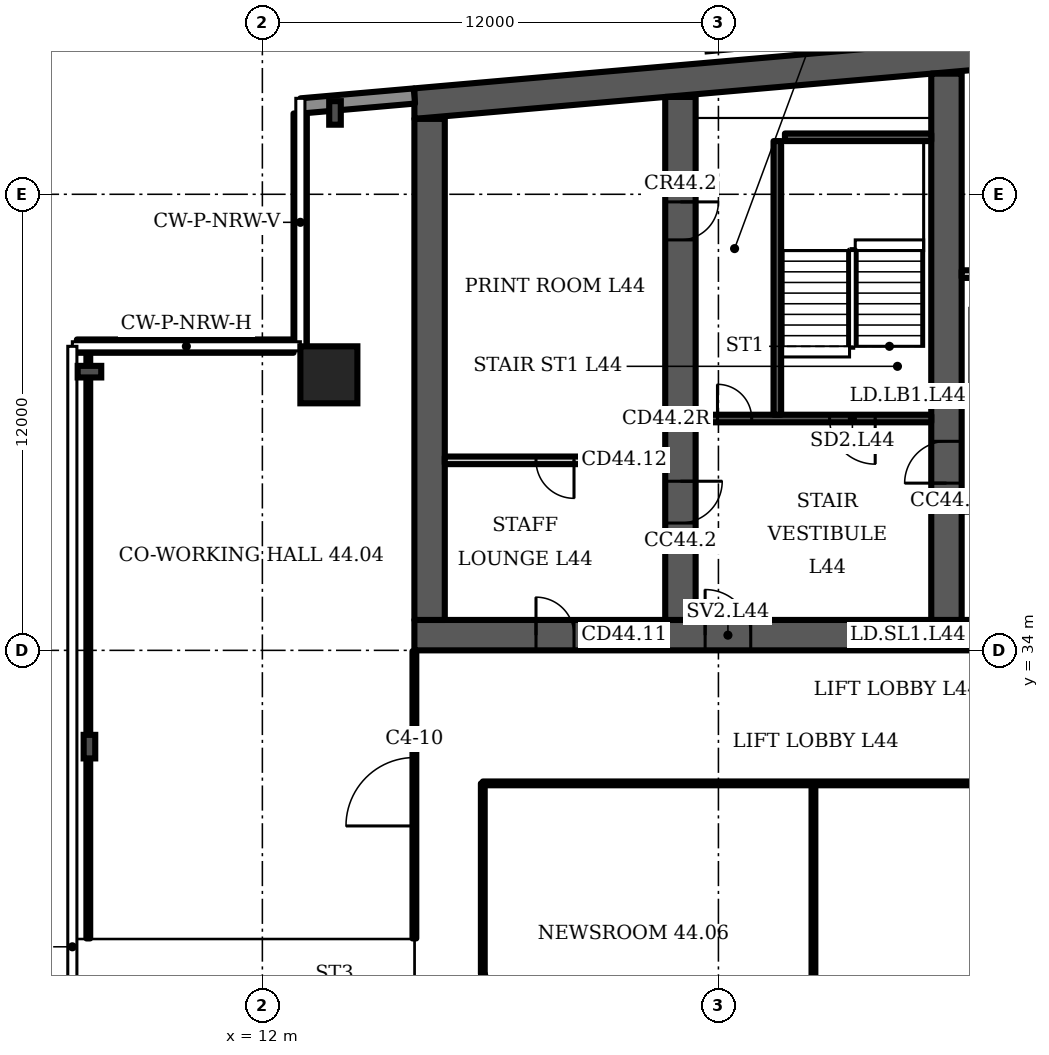
"""IFC4 building model, lengths in metres.
Left out: names, types, materials, properties, quantities, classifications, styles, units other than length and angle.
Written with IfcOpenShell. Run it as: python <this file> out.ifc"""

import sys

from ifc_helpers import new_model, si_unit, direction, frame, frame_2d, origin, origin_2d, place, context, subcontext, project, spatial, polyline, rectangle, i_section, outline, extrude, element, fill, save


model = new_model("IFC4")
c1 = context("Model", 3, precision=1e-05, world=origin(), true_north=direction((0.0, 1.0)))
c2 = subcontext(c1, "Body", "Model", "MODEL_VIEW")
j1 = project(units=[si_unit("LENGTHUNIT", "METRE"), si_unit("PLANEANGLEUNIT", "RADIAN")], contexts=[c1])
p1 = place(None, origin())
s1 = spatial("IfcSite", under=j1, at=p1, CompositionType="ELEMENT")
p2 = place(p1, origin())
s2 = spatial("IfcBuilding", under=s1, at=p2, CompositionType="ELEMENT")
p3 = place(p2, frame((0.0, 0.0, 180.7)))
s3 = spatial("IfcBuildingStorey", under=s2, at=p3, CompositionType="ELEMENT", Elevation=180.7)
p4 = place(p3, origin())
e1 = element("IfcWall", 1, at=p4, inside=s3, PredefinedType="SHEAR", context=c2, shape_type="SweptSolid", body=[
    extrude(outline(polyline([(16.0, 47.984), (37.0, 49.822), (58.0, 47.984), (58.0, 48.787), (37.0, 50.625), (16.0, 48.787), (16.0, 47.984)])), origin(), (0.0, 0.0, 1.0), 3.6),
])
p5 = place(p3, frame((16.0, 34.4, 0.0), z_axis=(0.0, 0.0, 1.0), x_axis=(1.0, 0.0, 0.0)))
e2 = element("IfcWall", 2, at=p5, inside=s3, PredefinedType="SHEAR", context=c2, shape_type="SweptSolid", body=[
    extrude(rectangle(XDim=42.0, YDim=0.8, at=frame_2d((21.0, 0.0))), origin(), (0.0, 0.0, 1.0), 3.6),
])
p6 = place(p5, frame((3.2, 0.0, 0.0)))
e3 = element("IfcOpeningElement", 3, at=p6, cuts=e2, PredefinedType="OPENING", context=c2, shape_type="SweptSolid", body=[
    extrude(rectangle(XDim=1.0, YDim=2.1, at=frame_2d((0.5, 1.05))), frame((0.0, 0.41, 0.0), z_axis=(0.0, -1.0, 0.0), x_axis=(1.0, 0.0, 0.0)), (0.0, 0.0, 1.0), 0.82),
])
p7 = place(p5, frame((7.65, 0.0, 0.0)))
e4 = element("IfcOpeningElement", 4, at=p7, cuts=e2, PredefinedType="OPENING", context=c2, shape_type="SweptSolid", body=[
    extrude(rectangle(XDim=1.2, YDim=2.1, at=frame_2d((0.6, 1.05))), frame((0.0, 0.41, 0.0), z_axis=(0.0, -1.0, 0.0), x_axis=(1.0, 0.0, 0.0)), (0.0, 0.0, 1.0), 0.82),
])
p8 = place(p5, frame((14.767, 0.0, 0.0)))
e5 = element("IfcOpeningElement", 5, at=p8, cuts=e2, PredefinedType="OPENING", context=c2, shape_type="SweptSolid", body=[
    extrude(rectangle(XDim=1.1, YDim=2.1, at=frame_2d((0.55, 1.05))), frame((0.0, 0.41, 0.0), z_axis=(0.0, -1.0, 0.0), x_axis=(1.0, 0.0, 0.0)), (0.0, 0.0, 1.0), 0.82),
])
p9 = place(p5, frame((19.133, 0.0, 0.0)))
e6 = element("IfcOpeningElement", 6, at=p9, cuts=e2, PredefinedType="OPENING", context=c2, shape_type="SweptSolid", body=[
    extrude(rectangle(XDim=1.1, YDim=2.1, at=frame_2d((0.55, 1.05))), frame((0.0, 0.41, 0.0), z_axis=(0.0, -1.0, 0.0), x_axis=(1.0, 0.0, 0.0)), (0.0, 0.0, 1.0), 0.82),
])
p10 = place(p5, frame((16.8, 0.0, 0.0)))
e7 = element("IfcOpeningElement", 7, at=p10, cuts=e2, PredefinedType="OPENING", context=c2, shape_type="SweptSolid", body=[
    extrude(rectangle(XDim=1.4, YDim=2.1, at=frame_2d((0.7, 1.05))), frame((0.0, 0.41, 0.0), z_axis=(0.0, -1.0, 0.0), x_axis=(1.0, 0.0, 0.0)), (0.0, 0.0, 1.0), 0.82),
])
p11 = place(p5, frame((21.767, 0.0, 0.0)))
e8 = element("IfcOpeningElement", 8, at=p11, cuts=e2, PredefinedType="OPENING", context=c2, shape_type="SweptSolid", body=[
    extrude(rectangle(XDim=1.1, YDim=2.1, at=frame_2d((0.55, 1.05))), frame((0.0, 0.41, 0.0), z_axis=(0.0, -1.0, 0.0), x_axis=(1.0, 0.0, 0.0)), (0.0, 0.0, 1.0), 0.82),
])
p12 = place(p5, frame((23.95, 0.0, 0.0)))
e9 = element("IfcOpeningElement", 9, at=p12, cuts=e2, PredefinedType="OPENING", context=c2, shape_type="SweptSolid", body=[
    extrude(rectangle(XDim=1.1, YDim=2.1, at=frame_2d((0.55, 1.05))), frame((0.0, 0.41, 0.0), z_axis=(0.0, -1.0, 0.0), x_axis=(1.0, 0.0, 0.0)), (0.0, 0.0, 1.0), 0.82),
])
p13 = place(p5, frame((26.133, 0.0, 0.0)))
e10 = element("IfcOpeningElement", 10, at=p13, cuts=e2, PredefinedType="OPENING", context=c2, shape_type="SweptSolid", body=[
    extrude(rectangle(XDim=1.1, YDim=2.1, at=frame_2d((0.55, 1.05))), frame((0.0, 0.41, 0.0), z_axis=(0.0, -1.0, 0.0), x_axis=(1.0, 0.0, 0.0)), (0.0, 0.0, 1.0), 0.82),
])
p14 = place(p5, frame((33.15, 0.0, 0.0)))
e11 = element("IfcOpeningElement", 11, at=p14, cuts=e2, PredefinedType="OPENING", context=c2, shape_type="SweptSolid", body=[
    extrude(rectangle(XDim=1.2, YDim=2.1, at=frame_2d((0.6, 1.05))), frame((0.0, 0.41, 0.0), z_axis=(0.0, -1.0, 0.0), x_axis=(1.0, 0.0, 0.0)), (0.0, 0.0, 1.0), 0.82),
])
p15 = place(p5, frame((37.767, 0.0, 0.0)))
e12 = element("IfcOpeningElement", 12, at=p15, cuts=e2, PredefinedType="OPENING", context=c2, shape_type="SweptSolid", body=[
    extrude(rectangle(XDim=1.4, YDim=2.1, at=frame_2d((0.7, 1.05))), frame((0.0, 0.41, 0.0), z_axis=(0.0, -1.0, 0.0), x_axis=(1.0, 0.0, 0.0)), (0.0, 0.0, 1.0), 0.82),
])
p16 = place(p3, frame((16.4, 34.8, 0.0), z_axis=(0.0, 0.0, 1.0), x_axis=(0.0, 1.0, 0.0)))
e13 = element("IfcWall", 13, at=p16, inside=s3, PredefinedType="SHEAR", context=c2, shape_type="SweptSolid", body=[
    extrude(rectangle(XDim=13.184, YDim=0.8, at=frame_2d((6.592, 0.0))), origin(), (0.0, 0.0, 1.0), 3.6),
])
p17 = place(p3, frame((23.0, 34.8, 0.0), z_axis=(0.0, 0.0, 1.0), x_axis=(0.0, 1.0, 0.0)))
e14 = element("IfcWall", 14, at=p17, inside=s3, PredefinedType="SHEAR", context=c2, shape_type="SweptSolid", body=[
    extrude(rectangle(XDim=13.762, YDim=0.8, at=frame_2d((6.881, 0.0))), origin(), (0.0, 0.0, 1.0), 3.6),
])
p18 = place(p17, frame((2.55, 0.0, 0.0)))
e15 = element("IfcOpeningElement", 15, at=p18, cuts=e14, PredefinedType="OPENING", context=c2, shape_type="SweptSolid", body=[
    extrude(rectangle(XDim=1.1, YDim=2.1, at=frame_2d((0.55, 1.05))), frame((0.0, 0.41, 0.0), z_axis=(0.0, -1.0, 0.0), x_axis=(1.0, 0.0, 0.0)), (0.0, 0.0, 1.0), 0.82),
])
p19 = place(p17, frame((10.0, 0.0, 0.0)))
e16 = element("IfcOpeningElement", 16, at=p19, cuts=e14, PredefinedType="OPENING", context=c2, shape_type="SweptSolid", body=[
    extrude(rectangle(XDim=1.0, YDim=2.1, at=frame_2d((0.5, 1.05))), frame((0.0, 0.41, 0.0), z_axis=(0.0, -1.0, 0.0), x_axis=(1.0, 0.0, 0.0)), (0.0, 0.0, 1.0), 0.82),
])
p20 = place(p3, frame((30.0, 34.8, 0.0), z_axis=(0.0, 0.0, 1.0), x_axis=(0.0, 1.0, 0.0)))
e17 = element("IfcWall", 17, at=p20, inside=s3, PredefinedType="SHEAR", context=c2, shape_type="SweptSolid", body=[
    extrude(rectangle(XDim=14.374, YDim=0.8, at=frame_2d((7.187, 0.0))), origin(), (0.0, 0.0, 1.0), 3.6),
])
p21 = place(p20, frame((3.6, 0.0, 0.0)))
e18 = element("IfcOpeningElement", 18, at=p21, cuts=e17, PredefinedType="OPENING", context=c2, shape_type="SweptSolid", body=[
    extrude(rectangle(XDim=1.1, YDim=2.1, at=frame_2d((0.55, 1.05))), frame((0.0, 0.41, 0.0), z_axis=(0.0, -1.0, 0.0), x_axis=(1.0, 0.0, 0.0)), (0.0, 0.0, 1.0), 0.82),
])
p22 = place(p3, frame((13.75, 41.25, 0.0), z_axis=(0.0, 0.0, 1.0), x_axis=(1.0, 0.0, 0.0)))
e19 = element("IfcColumn", 19, at=p22, inside=s3, PredefinedType="COLUMN", context=c2, shape_type="SweptSolid", body=[
    extrude(rectangle(XDim=1.5, YDim=1.5, at=origin_2d()), origin(), (0.0, 0.0, 1.0), 3.6),
])
for number, where, z_axis, x_axis in (
    (20, (13.911, 48.141, 0.0), (0.0, 0.0, 1.0), (-1.0, 0.0, 0.0)),
    (21, (7.45, 41.333, 0.0), (0.0, 0.0, 1.0), (0.0, 1.0, 0.0)),
    (22, (7.45, 31.467, 0.0), (0.0, 0.0, 1.0), (-1.0, 0.0, 0.0)),
):
    element("IfcColumn", number, at=place(p3, frame(where, z_axis=z_axis, x_axis=x_axis)), inside=s3, PredefinedType="COLUMN", context=c2, shape_type="SweptSolid", body=[
        extrude(i_section(OverallWidth=0.305, OverallDepth=0.62, WebThickness=0.021, FlangeThickness=0.04, FilletRadius=0.027, at=origin_2d()), origin(), (0.0, 0.0, 1.0), 3.6),
    ])
p23 = place(p3, frame((16.0, 48.587, 0.0), z_axis=(0.0, 0.0, 1.0), x_axis=(-0.996194, -0.087168, 0.0)))
e23 = element("IfcWall", 23, at=p23, inside=s3, PredefinedType="SOLIDWALL", context=c2, shape_type="SweptSolid", body=[
    extrude(rectangle(XDim=2.994, YDim=0.4, at=frame_2d((1.497, 0.0))), origin(), (0.0, 0.0, 1.0), 3.2),
])
p24 = place(p3, frame((12.995, 48.126, 0.0), z_axis=(0.0, 0.0, 1.0), x_axis=(0.0, -1.0, 0.0)))
e24 = element("IfcWall", 24, at=p24, inside=s3, PredefinedType="SOLIDWALL", context=c2, shape_type="SweptSolid", body=[
    extrude(rectangle(XDim=6.126, YDim=0.35, at=frame_2d((3.063, 0.0))), origin(), (0.0, 0.0, 1.0), 1.0),
])
p25 = place(p3, frame((12.82, 42.005, 0.0), z_axis=(0.0, 0.0, 1.0), x_axis=(-1.0, 0.0, 0.0)))
e25 = element("IfcWall", 25, at=p25, inside=s3, PredefinedType="SOLIDWALL", context=c2, shape_type="SweptSolid", body=[
    extrude(rectangle(XDim=5.7, YDim=0.35, at=frame_2d((2.85, 0.0))), origin(), (0.0, 0.0, 1.0), 1.0),
])
p26 = place(p3, frame((16.8, 39.0, 0.0), z_axis=(0.0, 0.0, 1.0), x_axis=(1.0, 0.0, 0.0)))
e26 = element("IfcWall", 26, at=p26, inside=s3, PredefinedType="PARTITIONING", context=c2, shape_type="SweptSolid", body=[
    extrude(rectangle(XDim=5.8, YDim=0.2, at=frame_2d((2.9, 0.0))), origin(), (0.0, 0.0, 1.0), 3.2),
])
p27 = place(p26, frame((2.4, 0.0, 0.0)))
e27 = element("IfcOpeningElement", 27, at=p27, cuts=e26, PredefinedType="OPENING", context=c2, shape_type="SweptSolid", body=[
    extrude(rectangle(XDim=1.0, YDim=2.1, at=frame_2d((0.5, 1.05))), frame((0.0, 0.11, 0.0), z_axis=(0.0, -1.0, 0.0), x_axis=(1.0, 0.0, 0.0)), (0.0, 0.0, 1.0), 0.22),
])
p28 = place(p3, frame((23.4, 40.1, 0.0), z_axis=(0.0, 0.0, 1.0), x_axis=(1.0, 0.0, 0.0)))
e28 = element("IfcWall", 28, at=p28, inside=s3, PredefinedType="SHEAR", context=c2, shape_type="SweptSolid", body=[
    extrude(rectangle(XDim=6.2, YDim=0.2, at=frame_2d((3.1, 0.0))), origin(), (0.0, 0.0, 1.0), 3.2),
])
p29 = place(p28, frame((3.525, 0.0, 0.0)))
e29 = element("IfcOpeningElement", 29, at=p29, cuts=e28, PredefinedType="OPENING", context=c2, shape_type="SweptSolid", body=[
    extrude(rectangle(XDim=1.2, YDim=2.1, at=frame_2d((0.6, 1.05))), frame((0.0, 0.11, 0.0), z_axis=(0.0, -1.0, 0.0), x_axis=(1.0, 0.0, 0.0)), (0.0, 0.0, 1.0), 0.22),
])
p30 = place(p28, frame((0.575, 0.0, 0.0)))
e30 = element("IfcOpeningElement", 30, at=p30, cuts=e28, PredefinedType="OPENING", context=c2, shape_type="SweptSolid", body=[
    extrude(rectangle(XDim=0.9, YDim=2.1, at=frame_2d((0.45, 1.05))), frame((0.0, 0.11, 0.0), z_axis=(0.0, -1.0, 0.0), x_axis=(1.0, 0.0, 0.0)), (0.0, 0.0, 1.0), 0.22),
])
p31 = place(p3, frame((25.55, 40.2, 0.0), z_axis=(0.0, 0.0, 1.0), x_axis=(0.0, 1.0, 0.0)))
e31 = element("IfcWall", 31, at=p31, inside=s3, PredefinedType="SHEAR", context=c2, shape_type="SweptSolid", body=[
    extrude(rectangle(XDim=7.2, YDim=0.2, at=frame_2d((3.6, 0.0))), origin(), (0.0, 0.0, 1.0), 3.2),
])
p32 = place(p3, frame((25.75, 47.5, 0.0), z_axis=(0.0, 0.0, 1.0), x_axis=(1.0, 0.0, 0.0)))
e32 = element("IfcWall", 32, at=p32, inside=s3, PredefinedType="SHEAR", context=c2, shape_type="SweptSolid", body=[
    extrude(rectangle(XDim=3.85, YDim=0.2, at=frame_2d((1.925, 0.0))), origin(), (0.0, 0.0, 1.0), 3.2),
])
p33 = place(p3, frame((30.4, 40.7, 0.0), z_axis=(0.0, 0.0, 1.0), x_axis=(1.0, 0.0, 0.0)))
e33 = element("IfcWall", 33, at=p33, inside=s3, PredefinedType="PARTITIONING", context=c2, shape_type="SweptSolid", body=[
    extrude(rectangle(XDim=6.2, YDim=0.2, at=frame_2d((3.1, 0.0))), origin(), (0.0, 0.0, 1.0), 3.2),
])
p34 = place(p33, frame((0.367, 0.0, 0.0)))
e34 = element("IfcOpeningElement", 34, at=p34, cuts=e33, PredefinedType="OPENING", context=c2, shape_type="SweptSolid", body=[
    extrude(rectangle(XDim=1.1, YDim=2.1, at=frame_2d((0.55, 1.05))), frame((0.0, 0.11, 0.0), z_axis=(0.0, -1.0, 0.0), x_axis=(1.0, 0.0, 0.0)), (0.0, 0.0, 1.0), 0.22),
])
p35 = place(p33, frame((2.55, 0.0, 0.0)))
e35 = element("IfcOpeningElement", 35, at=p35, cuts=e33, PredefinedType="OPENING", context=c2, shape_type="SweptSolid", body=[
    extrude(rectangle(XDim=1.1, YDim=2.1, at=frame_2d((0.55, 1.05))), frame((0.0, 0.11, 0.0), z_axis=(0.0, -1.0, 0.0), x_axis=(1.0, 0.0, 0.0)), (0.0, 0.0, 1.0), 0.22),
])
p36 = place(p33, frame((4.733, 0.0, 0.0)))
e36 = element("IfcOpeningElement", 36, at=p36, cuts=e33, PredefinedType="OPENING", context=c2, shape_type="SweptSolid", body=[
    extrude(rectangle(XDim=1.1, YDim=2.1, at=frame_2d((0.55, 1.05))), frame((0.0, 0.11, 0.0), z_axis=(0.0, -1.0, 0.0), x_axis=(1.0, 0.0, 0.0)), (0.0, 0.0, 1.0), 0.22),
])
p37 = place(p3, frame((0.0, 0.0, -0.0)))
e37 = element("IfcWall", 37, at=p37, inside=s3, PredefinedType="PARTITIONING", context=c2, shape_type="SweptSolid", body=[
    extrude(outline(polyline([(32.233, 37.65), (30.4, 37.65), (30.4, 37.85), (32.233, 37.85), (32.433, 37.85), (32.433, 34.8), (32.233, 34.8), (32.233, 37.65)])), origin(), (0.0, 0.0, 1.0), 3.2),
])
p38 = place(p3, frame((0.0, 0.0, -0.0)))
e38 = element("IfcWall", 38, at=p38, inside=s3, PredefinedType="PARTITIONING", context=c2, shape_type="SweptSolid", body=[
    extrude(outline(polyline([(32.433, 40.8), (32.233, 40.8), (32.233, 43.8), (30.4, 43.8), (30.4, 44.0), (36.6, 44.0), (36.6, 43.8), (34.767, 43.8), (34.767, 40.8), (34.567, 40.8), (34.567, 43.8), (32.433, 43.8), (32.433, 40.8)])), origin(), (0.0, 0.0, 1.0), 3.2),
])
p39 = place(p3, frame((7.42, 26.42, 0.0), z_axis=(0.0, 0.0, 1.0), x_axis=(0.0, 1.0, 0.0)))
e39 = element("IfcWall", 39, at=p39, inside=s3, PredefinedType="PARTITIONING", context=c2, shape_type="SweptSolid", body=[
    extrude(rectangle(XDim=15.56, YDim=0.1, at=frame_2d((7.78, 0.0))), origin(), (0.0, 0.0, 1.0), 2.58),
])
p40 = place(p3, frame((16.0, 26.42, 0.0), z_axis=(0.0, 0.0, 1.0), x_axis=(0.0, 1.0, 0.0)))
e40 = element("IfcWall", 40, at=p40, inside=s3, PredefinedType="PARTITIONING", context=c2, shape_type="SweptSolid", body=[
    extrude(rectangle(XDim=7.56, YDim=0.1, at=frame_2d((3.78, 0.0))), origin(), (0.0, 0.0, 1.0), 3.2),
])
p41 = place(p40, frame((2.96, 0.0, 0.0)))
e41 = element("IfcOpeningElement", 41, at=p41, cuts=e40, PredefinedType="OPENING", context=c2, shape_type="SweptSolid", body=[
    extrude(rectangle(XDim=1.8, YDim=2.1, at=frame_2d((0.9, 1.05))), frame((0.0, 0.06, 0.0), z_axis=(0.0, -1.0, 0.0), x_axis=(1.0, 0.0, 0.0)), (0.0, 0.0, 1.0), 0.12),
])
p42 = place(p3, frame((17.8, 25.485, 0.0), z_axis=(0.0, 0.0, 1.0), x_axis=(0.0, 1.0, 0.0)))
e42 = element("IfcWall", 42, at=p42, inside=s3, PredefinedType="PARTITIONING", context=c2, shape_type="SweptSolid", body=[
    extrude(rectangle(XDim=5.015, YDim=0.1, at=frame_2d((2.507, 0.0))), origin(), (0.0, 0.0, 1.0), 3.2),
])
p43 = place(p3, frame((17.8, 30.5, 0.0), z_axis=(0.0, 0.0, 1.0), x_axis=(1.0, 0.0, 0.0)))
e43 = element("IfcWall", 43, at=p43, inside=s3, PredefinedType="PARTITIONING", context=c2, shape_type="SweptSolid", body=[
    extrude(rectangle(XDim=19.05, YDim=0.1, at=frame_2d((9.525, 0.0))), origin(), (0.0, 0.0, 1.0), 3.2),
])
p44 = place(p3, frame((18.055, 24.66, 0.0), z_axis=(0.0, 0.0, 1.0), x_axis=(-0.295119, 0.955462, 0.0)))
e44 = element("IfcWall", 44, at=p44, inside=s3, PredefinedType="PARTITIONING", context=c2, shape_type="SweptSolid", body=[
    extrude(rectangle(XDim=0.864, YDim=0.1, at=frame_2d((0.432, 0.0))), origin(), (0.0, 0.0, 1.0), 3.2),
])
p45 = place(p3, frame((26.5, 13.535, 0.0), z_axis=(0.0, 0.0, 1.0), x_axis=(0.0, 1.0, 0.0)))
e45 = element("IfcWall", 45, at=p45, inside=s3, PredefinedType="PARTITIONING", context=c2, shape_type="SweptSolid", body=[
    extrude(rectangle(XDim=16.965, YDim=0.1, at=frame_2d((8.482, 0.0))), origin(), (0.0, 0.0, 1.0), 3.2),
])
p46 = place(p6, origin())
e46 = element("IfcDoor", 46, at=p46, inside=s3, OperationType="SINGLE_SWING_LEFT", PredefinedType="DOOR", context=c2, shape_type="SweptSolid", body=[
    extrude(rectangle(XDim=1.0, YDim=2.1, at=frame_2d((0.5, 1.05))), frame((0.0, 0.4, 0.0), z_axis=(0.0, -1.0, 0.0), x_axis=(1.0, 0.0, 0.0)), (0.0, 0.0, 1.0), 0.8),
])
fill(e3, e46)
p47 = place(p27, origin())
e47 = element("IfcDoor", 47, at=p47, inside=s3, OperationType="SINGLE_SWING_RIGHT", PredefinedType="DOOR", context=c2, shape_type="SweptSolid", body=[
    extrude(rectangle(XDim=1.0, YDim=2.1, at=frame_2d((0.5, 1.05))), frame((0.0, 0.025, 0.0), z_axis=(0.0, -1.0, 0.0), x_axis=(1.0, 0.0, 0.0)), (0.0, 0.0, 1.0), 0.05),
])
fill(e27, e47)
p48 = place(p29, origin())
e48 = element("IfcDoor", 48, at=p48, inside=s3, OperationType="SINGLE_SWING_RIGHT", PredefinedType="DOOR", context=c2, shape_type="SweptSolid", body=[
    extrude(rectangle(XDim=1.2, YDim=2.1, at=frame_2d((0.6, 1.05))), frame((0.0, 0.025, 0.0), z_axis=(0.0, -1.0, 0.0), x_axis=(1.0, 0.0, 0.0)), (0.0, 0.0, 1.0), 0.05),
])
fill(e29, e48)
p49 = place(p30, origin())
e49 = element("IfcDoor", 49, at=p49, inside=s3, OperationType="SINGLE_SWING_LEFT", PredefinedType="DOOR", context=c2, shape_type="SweptSolid", body=[
    extrude(rectangle(XDim=0.9, YDim=2.1, at=frame_2d((0.45, 1.05))), frame((0.0, 0.025, 0.0), z_axis=(0.0, -1.0, 0.0), x_axis=(1.0, 0.0, 0.0)), (0.0, 0.0, 1.0), 0.05),
])
fill(e30, e49)
p50 = place(p7, origin())
e50 = element("IfcDoor", 50, at=p50, inside=s3, OperationType="SINGLE_SWING_LEFT", PredefinedType="DOOR", context=c2, shape_type="SweptSolid", body=[
    extrude(rectangle(XDim=1.2, YDim=2.1, at=frame_2d((0.6, 1.05))), frame((0.0, 0.025, 0.0), z_axis=(0.0, -1.0, 0.0), x_axis=(1.0, 0.0, 0.0)), (0.0, 0.0, 1.0), 0.05),
])
fill(e4, e50)
p51 = place(p18, origin())
e51 = element("IfcDoor", 51, at=p51, inside=s3, OperationType="SINGLE_SWING_RIGHT", PredefinedType="DOOR", context=c2, shape_type="SweptSolid", body=[
    extrude(rectangle(XDim=1.1, YDim=2.1, at=frame_2d((0.55, 1.05))), frame((0.0, 0.025, 0.0), z_axis=(0.0, -1.0, 0.0), x_axis=(1.0, 0.0, 0.0)), (0.0, 0.0, 1.0), 0.05),
])
fill(e15, e51)
p52 = place(p19, origin())
e52 = element("IfcDoor", 52, at=p52, inside=s3, OperationType="SINGLE_SWING_RIGHT", PredefinedType="DOOR", context=c2, shape_type="SweptSolid", body=[
    extrude(rectangle(XDim=1.0, YDim=2.1, at=frame_2d((0.5, 1.05))), frame((0.0, 0.4, 0.0), z_axis=(0.0, -1.0, 0.0), x_axis=(1.0, 0.0, 0.0)), (0.0, 0.0, 1.0), 0.8),
])
fill(e16, e52)
p53 = place(p21, origin())
e53 = element("IfcDoor", 53, at=p53, inside=s3, OperationType="SINGLE_SWING_LEFT", PredefinedType="DOOR", context=c2, shape_type="SweptSolid", body=[
    extrude(rectangle(XDim=1.1, YDim=2.1, at=frame_2d((0.55, 1.05))), frame((0.0, 0.025, 0.0), z_axis=(0.0, -1.0, 0.0), x_axis=(1.0, 0.0, 0.0)), (0.0, 0.0, 1.0), 0.05),
])
fill(e18, e53)
p54 = place(p41, origin())
e54 = element("IfcDoor", 54, at=p54, inside=s3, OperationType="DOUBLE_DOOR_SINGLE_SWING", PredefinedType="DOOR", context=c2, shape_type="SweptSolid", body=[
    extrude(rectangle(XDim=1.8, YDim=2.1, at=frame_2d((0.9, 1.05))), frame((0.0, 0.025, 0.0), z_axis=(0.0, -1.0, 0.0), x_axis=(1.0, 0.0, 0.0)), (0.0, 0.0, 1.0), 0.05),
])
fill(e41, e54)
save(model, sys.argv[1])
